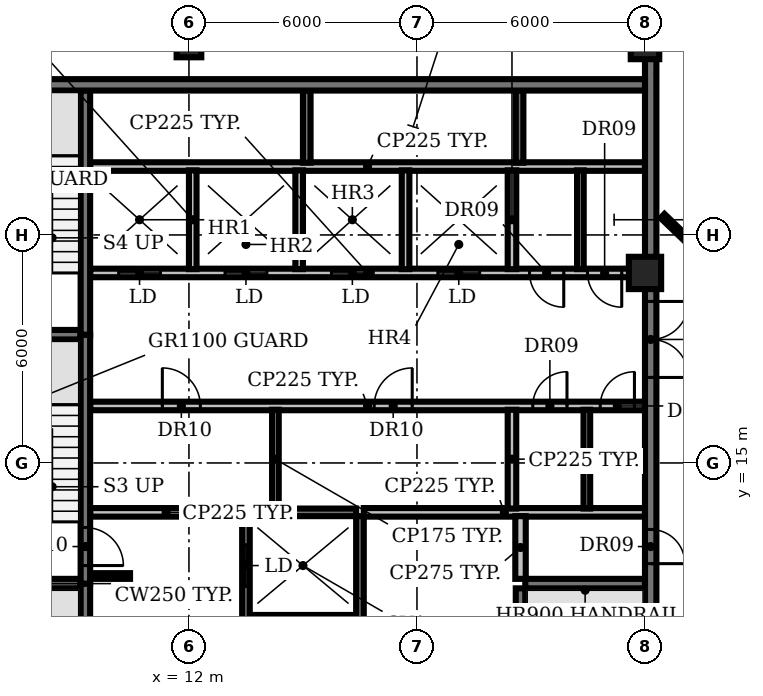
"""IFC4 building model, lengths in metres.
Left out: names, types, materials, properties, quantities, classifications, styles, units other than length and angle.
Written with IfcOpenShell. Run it as: python <this file> out.ifc"""

import sys

from ifc_helpers import new_model, si_unit, direction, frame, frame_2d, origin, origin_2d, place, context, subcontext, project, spatial, rectangle, circle, extrude, element, fill, save


model = new_model("IFC4")
c1 = context("Model", 3, precision=1e-05, world=origin(), true_north=direction((0.0, 1.0)))
c2 = subcontext(c1, "Body", "Model", "MODEL_VIEW")
j1 = project(units=[si_unit("LENGTHUNIT", "METRE"), si_unit("PLANEANGLEUNIT", "RADIAN")], contexts=[c1])
p1 = place(None, origin())
s1 = spatial("IfcSite", under=j1, at=p1, CompositionType="ELEMENT")
p2 = place(p1, origin())
s2 = spatial("IfcBuilding", under=s1, at=p2, CompositionType="ELEMENT")
p3 = place(p2, frame((0.0, 0.0, 293.6)))
s3 = spatial("IfcBuildingStorey", under=s2, at=p3, CompositionType="ELEMENT", Elevation=293.6)
p4 = place(p3, frame((12.0, 26.0, 0.0), z_axis=(0.0, 0.0, 1.0), x_axis=(1.0, 0.0, 0.0)))
e1 = element("IfcColumn", 1, at=p4, inside=s3, PredefinedType="COLUMN", context=c2, shape_type="SweptSolid", body=[
    extrude(rectangle(XDim=0.65, YDim=0.65, at=origin_2d()), origin(), (0.0, 0.0, 1.0), 3.85),
])
p5 = place(p3, frame((24.0, 20.0, 0.0), z_axis=(0.0, 0.0, 1.0), x_axis=(1.0, 0.0, 0.0)))
e2 = element("IfcColumn", 2, at=p5, inside=s3, PredefinedType="COLUMN", context=c2, shape_type="SweptSolid", body=[
    extrude(circle(Radius=0.425, at=origin_2d()), origin(), (0.0, 0.0, 1.0), 3.85),
])
p6 = place(p3, frame((24.0, 26.0, 0.0), z_axis=(0.0, 0.0, 1.0), x_axis=(1.0, 0.0, 0.0)))
e3 = element("IfcColumn", 3, at=p6, inside=s3, PredefinedType="COLUMN", context=c2, shape_type="SweptSolid", body=[
    extrude(rectangle(XDim=0.75, YDim=0.75, at=origin_2d()), origin(), (0.0, 0.0, 1.0), 3.85),
])
p7 = place(p3, frame((13.6, 10.9, 0.0), z_axis=(0.0, 0.0, 1.0), x_axis=(1.0, 0.0, 0.0)))
e4 = element("IfcWall", 4, at=p7, inside=s3, PredefinedType="SHEAR", context=c2, shape_type="SweptSolid", body=[
    extrude(rectangle(XDim=2.8, YDim=0.2, at=frame_2d((1.4, 0.0))), origin(), (0.0, 0.0, 1.0), 3.85),
])
for number, where, z_axis, x_axis in (
    (5, (6.0, 11.825, 0.0), (0.0, 0.0, 1.0), (1.0, 0.0, 0.0)),
    (6, (20.85, 11.825, 0.0), (0.0, 0.0, 1.0), (1.0, 0.0, 0.0)),
):
    element("IfcWall", number, at=place(p3, frame(where, z_axis=z_axis, x_axis=x_axis)), inside=s3, PredefinedType="SHEAR", context=c2, shape_type="SweptSolid", body=[
        extrude(rectangle(XDim=3.15, YDim=0.25, at=frame_2d((1.575, 0.0))), origin(), (0.0, 0.0, 1.0), 3.85),
    ])
p8 = place(p3, frame((9.4, 12.025, 0.0), z_axis=(0.0, 0.0, 1.0), x_axis=(1.0, 0.0, 0.0)))
e7 = element("IfcWall", 7, at=p8, inside=s3, PredefinedType="SHEAR", context=c2, shape_type="SweptSolid", body=[
    extrude(rectangle(XDim=1.05, YDim=0.15, at=frame_2d((0.525, 0.0))), origin(), (0.0, 0.0, 1.0), 3.85),
])
p9 = place(p3, frame((9.4, 13.7, 0.0), z_axis=(0.0, 0.0, 1.0), x_axis=(1.0, 0.0, 0.0)))
e8 = element("IfcWall", 8, at=p9, inside=s3, PredefinedType="PARTITIONING", context=c2, shape_type="SweptSolid", body=[
    extrude(rectangle(XDim=4.0, YDim=0.225, at=frame_2d((2.0, 0.0))), origin(), (0.0, 0.0, 1.0), 3.85),
])
p10 = place(p3, frame((13.6, 13.7, 0.0), z_axis=(0.0, 0.0, 1.0), x_axis=(1.0, 0.0, 0.0)))
e9 = element("IfcWall", 9, at=p10, inside=s3, PredefinedType="SHEAR", context=c2, shape_type="SweptSolid", body=[
    extrude(rectangle(XDim=2.8, YDim=0.2, at=frame_2d((1.4, 0.0))), origin(), (0.0, 0.0, 1.0), 3.85),
])
p11 = place(p3, frame((16.6, 13.7, 0.0), z_axis=(0.0, 0.0, 1.0), x_axis=(1.0, 0.0, 0.0)))
e10 = element("IfcWall", 10, at=p11, inside=s3, PredefinedType="PARTITIONING", context=c2, shape_type="SweptSolid", body=[
    extrude(rectangle(XDim=7.4, YDim=0.225, at=frame_2d((3.7, 0.0))), origin(), (0.0, 0.0, 1.0), 3.85),
])
p12 = place(p3, frame((9.4, 16.5, 0.0), z_axis=(0.0, 0.0, 1.0), x_axis=(1.0, 0.0, 0.0)))
e11 = element("IfcWall", 11, at=p12, inside=s3, PredefinedType="PARTITIONING", context=c2, shape_type="SweptSolid", body=[
    extrude(rectangle(XDim=14.6, YDim=0.225, at=frame_2d((7.3, 0.0))), origin(), (0.0, 0.0, 1.0), 3.85),
])
p13 = place(p12, frame((1.9, 0.0, 0.0)))
e12 = element("IfcOpeningElement", 12, at=p13, cuts=e11, PredefinedType="OPENING", context=c2, shape_type="SweptSolid", body=[
    extrude(rectangle(XDim=1.0, YDim=2.1, at=frame_2d((0.5, 1.05))), frame((0.0, 0.123, 0.0), z_axis=(0.0, -1.0, 0.0), x_axis=(1.0, 0.0, 0.0)), (0.0, 0.0, 1.0), 0.245),
])
p14 = place(p12, frame((7.475, 0.0, 0.0)))
e13 = element("IfcOpeningElement", 13, at=p14, cuts=e11, PredefinedType="OPENING", context=c2, shape_type="SweptSolid", body=[
    extrude(rectangle(XDim=1.0, YDim=2.1, at=frame_2d((0.5, 1.05))), frame((0.0, 0.123, 0.0), z_axis=(0.0, -1.0, 0.0), x_axis=(1.0, 0.0, 0.0)), (0.0, 0.0, 1.0), 0.245),
])
p15 = place(p12, frame((11.647, 0.0, 0.0)))
e14 = element("IfcOpeningElement", 14, at=p15, cuts=e11, PredefinedType="OPENING", context=c2, shape_type="SweptSolid", body=[
    extrude(rectangle(XDim=0.9, YDim=2.1, at=frame_2d((0.45, 1.05))), frame((0.0, 0.123, 0.0), z_axis=(0.0, -1.0, 0.0), x_axis=(1.0, 0.0, 0.0)), (0.0, 0.0, 1.0), 0.245),
])
p16 = place(p12, frame((13.423, 0.0, 0.0)))
e15 = element("IfcOpeningElement", 15, at=p16, cuts=e11, PredefinedType="OPENING", context=c2, shape_type="SweptSolid", body=[
    extrude(rectangle(XDim=0.9, YDim=2.1, at=frame_2d((0.45, 1.05))), frame((0.0, 0.123, 0.0), z_axis=(0.0, -1.0, 0.0), x_axis=(1.0, 0.0, 0.0)), (0.0, 0.0, 1.0), 0.245),
])
p17 = place(p3, frame((6.0, 18.375, 0.0), z_axis=(0.0, 0.0, 1.0), x_axis=(1.0, 0.0, 0.0)))
e16 = element("IfcWall", 16, at=p17, inside=s3, PredefinedType="SHEAR", context=c2, shape_type="SweptSolid", body=[
    extrude(rectangle(XDim=3.15, YDim=0.25, at=frame_2d((1.575, 0.0))), origin(), (0.0, 0.0, 1.0), 3.85),
])
p18 = place(p3, frame((24.0, 20.0, 0.0), z_axis=(0.0, 0.0, 1.0), x_axis=(-1.0, 0.0, 0.0)))
e17 = element("IfcWall", 17, at=p18, inside=s3, PredefinedType="PARTITIONING", context=c2, shape_type="SweptSolid", body=[
    extrude(rectangle(XDim=14.6, YDim=0.225, at=frame_2d((7.3, 0.0))), origin(), (0.0, 0.0, 1.0), 3.85),
])
p19 = place(p18, frame((12.75, 0.0, 0.0)))
e18 = element("IfcOpeningElement", 18, at=p19, cuts=e17, PredefinedType="OPENING", context=c2, shape_type="SweptSolid", body=[
    extrude(rectangle(XDim=1.1, YDim=2.1, at=frame_2d((0.55, 1.05))), frame((0.0, 0.123, 0.0), z_axis=(0.0, -1.0, 0.0), x_axis=(1.0, 0.0, 0.0)), (0.0, 0.0, 1.0), 0.245),
])
p20 = place(p18, frame((9.95, 0.0, 0.0)))
e19 = element("IfcOpeningElement", 19, at=p20, cuts=e17, PredefinedType="OPENING", context=c2, shape_type="SweptSolid", body=[
    extrude(rectangle(XDim=1.1, YDim=2.1, at=frame_2d((0.55, 1.05))), frame((0.0, 0.123, 0.0), z_axis=(0.0, -1.0, 0.0), x_axis=(1.0, 0.0, 0.0)), (0.0, 0.0, 1.0), 0.245),
])
p21 = place(p18, frame((7.15, 0.0, 0.0)))
e20 = element("IfcOpeningElement", 20, at=p21, cuts=e17, PredefinedType="OPENING", context=c2, shape_type="SweptSolid", body=[
    extrude(rectangle(XDim=1.1, YDim=2.1, at=frame_2d((0.55, 1.05))), frame((0.0, 0.123, 0.0), z_axis=(0.0, -1.0, 0.0), x_axis=(1.0, 0.0, 0.0)), (0.0, 0.0, 1.0), 0.245),
])
p22 = place(p18, frame((4.35, 0.0, 0.0)))
e21 = element("IfcOpeningElement", 21, at=p22, cuts=e17, PredefinedType="OPENING", context=c2, shape_type="SweptSolid", body=[
    extrude(rectangle(XDim=1.1, YDim=2.1, at=frame_2d((0.55, 1.05))), frame((0.0, 0.123, 0.0), z_axis=(0.0, -1.0, 0.0), x_axis=(1.0, 0.0, 0.0)), (0.0, 0.0, 1.0), 0.245),
])
p23 = place(p18, frame((2.137, 0.0, 0.0)))
e22 = element("IfcOpeningElement", 22, at=p23, cuts=e17, PredefinedType="OPENING", context=c2, shape_type="SweptSolid", body=[
    extrude(rectangle(XDim=0.9, YDim=2.1, at=frame_2d((0.45, 1.05))), frame((0.0, 0.123, 0.0), z_axis=(0.0, -1.0, 0.0), x_axis=(1.0, 0.0, 0.0)), (0.0, 0.0, 1.0), 0.245),
])
p24 = place(p18, frame((0.612, 0.0, 0.0)))
e23 = element("IfcOpeningElement", 23, at=p24, cuts=e17, PredefinedType="OPENING", context=c2, shape_type="SweptSolid", body=[
    extrude(rectangle(XDim=0.9, YDim=2.1, at=frame_2d((0.45, 1.05))), frame((0.0, 0.123, 0.0), z_axis=(0.0, -1.0, 0.0), x_axis=(1.0, 0.0, 0.0)), (0.0, 0.0, 1.0), 0.245),
])
p25 = place(p3, frame((9.4, 22.8, 0.0), z_axis=(0.0, 0.0, 1.0), x_axis=(1.0, 0.0, 0.0)))
e24 = element("IfcWall", 24, at=p25, inside=s3, PredefinedType="PARTITIONING", context=c2, shape_type="SweptSolid", body=[
    extrude(rectangle(XDim=14.6, YDim=0.225, at=frame_2d((7.3, 0.0))), origin(), (0.0, 0.0, 1.0), 3.85),
])
p26 = place(p3, frame((9.275, 11.825, 0.0), z_axis=(0.0, 0.0, 1.0), x_axis=(0.0, -1.0, 0.0)))
e25 = element("IfcWall", 25, at=p26, inside=s3, PredefinedType="SHEAR", context=c2, shape_type="SweptSolid", body=[
    extrude(rectangle(XDim=6.425, YDim=0.25, at=frame_2d((3.212, 0.0))), origin(), (0.0, 0.0, 1.0), 3.85),
])
p27 = place(p26, frame((5.075, 0.0, 0.0)))
e26 = element("IfcOpeningElement", 26, at=p27, cuts=e25, PredefinedType="OPENING", context=c2, shape_type="SweptSolid", body=[
    extrude(rectangle(XDim=1.0, YDim=2.1, at=frame_2d((0.5, 1.05))), frame((0.0, 0.135, 0.0), z_axis=(0.0, -1.0, 0.0), x_axis=(1.0, 0.0, 0.0)), (0.0, 0.0, 1.0), 0.27),
])
p28 = place(p3, frame((9.275, 18.375, 0.0), z_axis=(0.0, 0.0, 1.0), x_axis=(0.0, -1.0, 0.0)))
e27 = element("IfcWall", 27, at=p28, inside=s3, PredefinedType="SHEAR", context=c2, shape_type="SweptSolid", body=[
    extrude(rectangle(XDim=6.55, YDim=0.25, at=frame_2d((3.275, 0.0))), origin(), (0.0, 0.0, 1.0), 3.85),
])
p29 = place(p28, frame((5.075, 0.0, 0.0)))
e28 = element("IfcOpeningElement", 28, at=p29, cuts=e27, PredefinedType="OPENING", context=c2, shape_type="SweptSolid", body=[
    extrude(rectangle(XDim=1.0, YDim=2.1, at=frame_2d((0.5, 1.05))), frame((0.0, 0.135, 0.0), z_axis=(0.0, -1.0, 0.0), x_axis=(1.0, 0.0, 0.0)), (0.0, 0.0, 1.0), 0.27),
])
p30 = place(p3, frame((9.275, 18.375, 0.0), z_axis=(0.0, 0.0, 1.0), x_axis=(0.0, 1.0, 0.0)))
e29 = element("IfcWall", 29, at=p30, inside=s3, PredefinedType="SHEAR", context=c2, shape_type="SweptSolid", body=[
    extrude(rectangle(XDim=6.425, YDim=0.25, at=frame_2d((3.212, 0.0))), origin(), (0.0, 0.0, 1.0), 3.85),
])
p31 = place(p3, frame((12.1, 20.1, 0.0), z_axis=(0.0, 0.0, 1.0), x_axis=(0.0, 1.0, 0.0)))
e30 = element("IfcWall", 30, at=p31, inside=s3, PredefinedType="SOLIDWALL", context=c2, shape_type="SweptSolid", body=[
    extrude(rectangle(XDim=2.6, YDim=0.2, at=frame_2d((1.3, 0.0))), origin(), (0.0, 0.0, 1.0), 3.85),
])
p32 = place(p3, frame((13.5, 5.4, 0.0), z_axis=(0.0, 0.0, 1.0), x_axis=(0.0, 1.0, 0.0)))
e31 = element("IfcWall", 31, at=p32, inside=s3, PredefinedType="SHEAR", context=c2, shape_type="SweptSolid", body=[
    extrude(rectangle(XDim=8.2, YDim=0.2, at=frame_2d((4.1, 0.0))), origin(), (0.0, 0.0, 1.0), 3.85),
])
p33 = place(p32, frame((0.75, 0.0, 0.0)))
e32 = element("IfcOpeningElement", 32, at=p33, cuts=e31, PredefinedType="OPENING", context=c2, shape_type="SweptSolid", body=[
    extrude(rectangle(XDim=1.1, YDim=2.1, at=frame_2d((0.55, 1.05))), frame((0.0, 0.11, 0.0), z_axis=(0.0, -1.0, 0.0), x_axis=(1.0, 0.0, 0.0)), (0.0, 0.0, 1.0), 0.22),
])
p34 = place(p32, frame((3.55, 0.0, 0.0)))
e33 = element("IfcOpeningElement", 33, at=p34, cuts=e31, PredefinedType="OPENING", context=c2, shape_type="SweptSolid", body=[
    extrude(rectangle(XDim=1.1, YDim=2.1, at=frame_2d((0.55, 1.05))), frame((0.0, 0.11, 0.0), z_axis=(0.0, -1.0, 0.0), x_axis=(1.0, 0.0, 0.0)), (0.0, 0.0, 1.0), 0.22),
])
p35 = place(p32, frame((6.35, 0.0, 0.0)))
e34 = element("IfcOpeningElement", 34, at=p35, cuts=e31, PredefinedType="OPENING", context=c2, shape_type="SweptSolid", body=[
    extrude(rectangle(XDim=1.1, YDim=2.1, at=frame_2d((0.55, 1.05))), frame((0.0, 0.11, 0.0), z_axis=(0.0, -1.0, 0.0), x_axis=(1.0, 0.0, 0.0)), (0.0, 0.0, 1.0), 0.22),
])
p36 = place(p3, frame((14.275, 13.8, 0.0), z_axis=(0.0, 0.0, 1.0), x_axis=(0.0, 1.0, 0.0)))
e35 = element("IfcWall", 35, at=p36, inside=s3, PredefinedType="PARTITIONING", context=c2, shape_type="SweptSolid", body=[
    extrude(rectangle(XDim=2.6, YDim=0.175, at=frame_2d((1.3, 0.0))), origin(), (0.0, 0.0, 1.0), 3.85),
])
p37 = place(p3, frame((14.9, 20.1, 0.0), z_axis=(0.0, 0.0, 1.0), x_axis=(0.0, 1.0, 0.0)))
e36 = element("IfcWall", 36, at=p37, inside=s3, PredefinedType="SOLIDWALL", context=c2, shape_type="SweptSolid", body=[
    extrude(rectangle(XDim=2.6, YDim=0.2, at=frame_2d((1.3, 0.0))), origin(), (0.0, 0.0, 1.0), 3.85),
])
p38 = place(p3, frame((15.1, 22.9, 0.0), z_axis=(0.0, 0.0, 1.0), x_axis=(0.0, 1.0, 0.0)))
e37 = element("IfcWall", 37, at=p38, inside=s3, PredefinedType="SHEAR", context=c2, shape_type="SweptSolid", body=[
    extrude(rectangle(XDim=1.9, YDim=0.2, at=frame_2d((0.95, 0.0))), origin(), (0.0, 0.0, 1.0), 3.85),
])
p39 = place(p3, frame((16.5, 5.4, 0.0), z_axis=(0.0, 0.0, 1.0), x_axis=(0.0, 1.0, 0.0)))
e38 = element("IfcWall", 38, at=p39, inside=s3, PredefinedType="SHEAR", context=c2, shape_type="SweptSolid", body=[
    extrude(rectangle(XDim=8.2, YDim=0.2, at=frame_2d((4.1, 0.0))), origin(), (0.0, 0.0, 1.0), 3.85),
])
p40 = place(p3, frame((17.7, 20.1, 0.0), z_axis=(0.0, 0.0, 1.0), x_axis=(0.0, 1.0, 0.0)))
e39 = element("IfcWall", 39, at=p40, inside=s3, PredefinedType="SOLIDWALL", context=c2, shape_type="SweptSolid", body=[
    extrude(rectangle(XDim=2.6, YDim=0.2, at=frame_2d((1.3, 0.0))), origin(), (0.0, 0.0, 1.0), 3.85),
])
for number, where, z_axis, x_axis in (
    (40, (20.5, 13.8, 0.0), (0.0, 0.0, 1.0), (0.0, 1.0, 0.0)),
    (41, (20.5, 20.1, 0.0), (0.0, 0.0, 1.0), (0.0, 1.0, 0.0)),
):
    element("IfcWall", number, at=place(p3, frame(where, z_axis=z_axis, x_axis=x_axis)), inside=s3, PredefinedType="PARTITIONING", context=c2, shape_type="SweptSolid", body=[
        extrude(rectangle(XDim=2.6, YDim=0.225, at=frame_2d((1.3, 0.0))), origin(), (0.0, 0.0, 1.0), 3.85),
    ])
p41 = place(p3, frame((20.7, 22.9, 0.0), z_axis=(0.0, 0.0, 1.0), x_axis=(0.0, 1.0, 0.0)))
e42 = element("IfcWall", 42, at=p41, inside=s3, PredefinedType="SHEAR", context=c2, shape_type="SweptSolid", body=[
    extrude(rectangle(XDim=1.9, YDim=0.2, at=frame_2d((0.95, 0.0))), origin(), (0.0, 0.0, 1.0), 3.85),
])
p42 = place(p3, frame((20.725, 5.4, 0.0), z_axis=(0.0, 0.0, 1.0), x_axis=(0.0, 1.0, 0.0)))
e43 = element("IfcWall", 43, at=p42, inside=s3, PredefinedType="SHEAR", context=c2, shape_type="SweptSolid", body=[
    extrude(rectangle(XDim=6.3, YDim=0.25, at=frame_2d((3.15, 0.0))), origin(), (0.0, 0.0, 1.0), 3.85),
])
p43 = place(p3, frame((20.725, 11.95, 0.0), z_axis=(0.0, 0.0, 1.0), x_axis=(0.0, 1.0, 0.0)))
e44 = element("IfcWall", 44, at=p43, inside=s3, PredefinedType="PARTITIONING", context=c2, shape_type="SweptSolid", body=[
    extrude(rectangle(XDim=1.65, YDim=0.275, at=frame_2d((0.825, 0.0))), origin(), (0.0, 0.0, 1.0), 3.85),
])
for number, where, z_axis, x_axis in (
    (45, (22.3, 20.1, 0.0), (0.0, 0.0, 1.0), (0.0, 1.0, 0.0)),
    (46, (22.47, 13.8, 0.0), (0.0, 0.0, 1.0), (0.0, 1.0, 0.0)),
):
    element("IfcWall", number, at=place(p3, frame(where, z_axis=z_axis, x_axis=x_axis)), inside=s3, PredefinedType="PARTITIONING", context=c2, shape_type="SweptSolid", body=[
        extrude(rectangle(XDim=2.6, YDim=0.175, at=frame_2d((1.3, 0.0))), origin(), (0.0, 0.0, 1.0), 3.85),
    ])
p44 = place(p3, frame((24.15, 25.655, 0.0), z_axis=(0.0, 0.0, 1.0), x_axis=(0.0, -1.0, 0.0)))
e47 = element("IfcWall", 47, at=p44, inside=s3, PredefinedType="SHEAR", context=c2, shape_type="SweptSolid", body=[
    extrude(rectangle(XDim=20.555, YDim=0.3, at=frame_2d((10.277, 0.0))), origin(), (0.0, 0.0, 1.0), 3.85),
])
p45 = place(p44, frame((18.505, 0.0, 0.0)))
e48 = element("IfcOpeningElement", 48, at=p45, cuts=e47, PredefinedType="OPENING", context=c2, shape_type="SweptSolid", body=[
    extrude(rectangle(XDim=1.5, YDim=2.1, at=frame_2d((0.75, 1.05))), frame((0.0, 0.16, 0.0), z_axis=(0.0, -1.0, 0.0), x_axis=(1.0, 0.0, 0.0)), (0.0, 0.0, 1.0), 0.32),
])
p46 = place(p44, frame((12.405, 0.0, 0.0)))
e49 = element("IfcOpeningElement", 49, at=p46, cuts=e47, PredefinedType="OPENING", context=c2, shape_type="SweptSolid", body=[
    extrude(rectangle(XDim=0.9, YDim=2.1, at=frame_2d((0.45, 1.05))), frame((0.0, 0.16, 0.0), z_axis=(0.0, -1.0, 0.0), x_axis=(1.0, 0.0, 0.0)), (0.0, 0.0, 1.0), 0.32),
])
p47 = place(p44, frame((6.405, 0.0, 0.0)))
e50 = element("IfcOpeningElement", 50, at=p47, cuts=e47, PredefinedType="OPENING", context=c2, shape_type="SweptSolid", body=[
    extrude(rectangle(XDim=2.0, YDim=2.1, at=frame_2d((1.0, 1.05))), frame((0.0, 0.16, 0.0), z_axis=(0.0, -1.0, 0.0), x_axis=(1.0, 0.0, 0.0)), (0.0, 0.0, 1.0), 0.32),
])
p48 = place(p3, frame((6.0, 24.95, 0.0), z_axis=(0.0, 0.0, 1.0), x_axis=(1.0, 0.0, 0.0)))
e51 = element("IfcWall", 51, at=p48, inside=s3, PredefinedType="SHEAR", context=c2, shape_type="SweptSolid", body=[
    extrude(rectangle(XDim=18.0, YDim=0.3, at=frame_2d((9.0, 0.0))), origin(), (0.0, 0.0, 1.0), 3.85),
])
p49 = place(p3, frame((24.46, 21.5, 0.0), z_axis=(0.0, 0.0, 1.0), x_axis=(0.720809322513, -0.69313340749, 0.0)))
e52 = element("IfcWall", 52, at=p49, inside=s3, PredefinedType="PARTITIONING", context=c2, shape_type="SweptSolid", body=[
    extrude(rectangle(XDim=0.988, YDim=0.15, at=frame_2d((0.494, 0.0))), origin(), (0.0, 0.0, 1.0), 2.9),
])
p50 = place(p13, origin())
e53 = element("IfcDoor", 53, at=p50, inside=s3, OperationType="SINGLE_SWING_LEFT", PredefinedType="DOOR", context=c2, shape_type="SweptSolid", body=[
    extrude(rectangle(XDim=1.0, YDim=2.1, at=frame_2d((0.5, 1.05))), frame((0.0, 0.025, 0.0), z_axis=(0.0, -1.0, 0.0), x_axis=(1.0, 0.0, 0.0)), (0.0, 0.0, 1.0), 0.05),
])
fill(e12, e53)
p51 = place(p14, origin())
e54 = element("IfcDoor", 54, at=p51, inside=s3, OperationType="SINGLE_SWING_RIGHT", PredefinedType="DOOR", context=c2, shape_type="SweptSolid", body=[
    extrude(rectangle(XDim=1.0, YDim=2.1, at=frame_2d((0.5, 1.05))), frame((0.0, 0.025, 0.0), z_axis=(0.0, -1.0, 0.0), x_axis=(1.0, 0.0, 0.0)), (0.0, 0.0, 1.0), 0.05),
])
fill(e13, e54)
p52 = place(p15, origin())
e55 = element("IfcDoor", 55, at=p52, inside=s3, OperationType="SINGLE_SWING_RIGHT", PredefinedType="DOOR", context=c2, shape_type="SweptSolid", body=[
    extrude(rectangle(XDim=0.9, YDim=2.1, at=frame_2d((0.45, 1.05))), frame((0.0, 0.025, 0.0), z_axis=(0.0, -1.0, 0.0), x_axis=(1.0, 0.0, 0.0)), (0.0, 0.0, 1.0), 0.05),
])
fill(e14, e55)
p53 = place(p16, origin())
e56 = element("IfcDoor", 56, at=p53, inside=s3, OperationType="SINGLE_SWING_RIGHT", PredefinedType="DOOR", context=c2, shape_type="SweptSolid", body=[
    extrude(rectangle(XDim=0.9, YDim=2.1, at=frame_2d((0.45, 1.05))), frame((0.0, 0.025, 0.0), z_axis=(0.0, -1.0, 0.0), x_axis=(1.0, 0.0, 0.0)), (0.0, 0.0, 1.0), 0.05),
])
fill(e15, e56)
p54 = place(p19, origin())
e57 = element("IfcDoor", 57, at=p54, inside=s3, OperationType="DOUBLE_DOOR_SLIDING", PredefinedType="DOOR", context=c2, shape_type="SweptSolid", body=[
    extrude(rectangle(XDim=1.1, YDim=2.1, at=frame_2d((0.55, 1.05))), frame((0.0, 0.025, 0.0), z_axis=(0.0, -1.0, 0.0), x_axis=(1.0, 0.0, 0.0)), (0.0, 0.0, 1.0), 0.05),
])
fill(e18, e57)
p55 = place(p20, origin())
e58 = element("IfcDoor", 58, at=p55, inside=s3, OperationType="DOUBLE_DOOR_SLIDING", PredefinedType="DOOR", context=c2, shape_type="SweptSolid", body=[
    extrude(rectangle(XDim=1.1, YDim=2.1, at=frame_2d((0.55, 1.05))), frame((0.0, 0.025, 0.0), z_axis=(0.0, -1.0, 0.0), x_axis=(1.0, 0.0, 0.0)), (0.0, 0.0, 1.0), 0.05),
])
fill(e19, e58)
p56 = place(p21, origin())
e59 = element("IfcDoor", 59, at=p56, inside=s3, OperationType="DOUBLE_DOOR_SLIDING", PredefinedType="DOOR", context=c2, shape_type="SweptSolid", body=[
    extrude(rectangle(XDim=1.1, YDim=2.1, at=frame_2d((0.55, 1.05))), frame((0.0, 0.025, 0.0), z_axis=(0.0, -1.0, 0.0), x_axis=(1.0, 0.0, 0.0)), (0.0, 0.0, 1.0), 0.05),
])
fill(e20, e59)
p57 = place(p22, origin())
e60 = element("IfcDoor", 60, at=p57, inside=s3, OperationType="DOUBLE_DOOR_SLIDING", PredefinedType="DOOR", context=c2, shape_type="SweptSolid", body=[
    extrude(rectangle(XDim=1.1, YDim=2.1, at=frame_2d((0.55, 1.05))), frame((0.0, 0.025, 0.0), z_axis=(0.0, -1.0, 0.0), x_axis=(1.0, 0.0, 0.0)), (0.0, 0.0, 1.0), 0.05),
])
fill(e21, e60)
p58 = place(p23, origin())
e61 = element("IfcDoor", 61, at=p58, inside=s3, OperationType="SINGLE_SWING_LEFT", PredefinedType="DOOR", context=c2, shape_type="SweptSolid", body=[
    extrude(rectangle(XDim=0.9, YDim=2.1, at=frame_2d((0.45, 1.05))), frame((0.0, 0.025, 0.0), z_axis=(0.0, -1.0, 0.0), x_axis=(1.0, 0.0, 0.0)), (0.0, 0.0, 1.0), 0.05),
])
fill(e22, e61)
p59 = place(p24, origin())
e62 = element("IfcDoor", 62, at=p59, inside=s3, OperationType="SINGLE_SWING_LEFT", PredefinedType="DOOR", context=c2, shape_type="SweptSolid", body=[
    extrude(rectangle(XDim=0.9, YDim=2.1, at=frame_2d((0.45, 1.05))), frame((0.0, 0.025, 0.0), z_axis=(0.0, -1.0, 0.0), x_axis=(1.0, 0.0, 0.0)), (0.0, 0.0, 1.0), 0.05),
])
fill(e23, e62)
p60 = place(p29, origin())
e63 = element("IfcDoor", 63, at=p60, inside=s3, OperationType="SINGLE_SWING_RIGHT", PredefinedType="DOOR", context=c2, shape_type="SweptSolid", body=[
    extrude(rectangle(XDim=1.0, YDim=2.1, at=frame_2d((0.5, 1.05))), frame((0.0, 0.025, 0.0), z_axis=(0.0, -1.0, 0.0), x_axis=(1.0, 0.0, 0.0)), (0.0, 0.0, 1.0), 0.05),
])
fill(e28, e63)
p61 = place(p35, origin())
e64 = element("IfcDoor", 64, at=p61, inside=s3, OperationType="DOUBLE_DOOR_SLIDING", PredefinedType="DOOR", context=c2, shape_type="SweptSolid", body=[
    extrude(rectangle(XDim=1.1, YDim=2.1, at=frame_2d((0.55, 1.05))), frame((0.0, 0.025, 0.0), z_axis=(0.0, -1.0, 0.0), x_axis=(1.0, 0.0, 0.0)), (0.0, 0.0, 1.0), 0.05),
])
fill(e34, e64)
p62 = place(p46, origin())
e65 = element("IfcDoor", 65, at=p62, inside=s3, OperationType="SINGLE_SWING_RIGHT", PredefinedType="DOOR", context=c2, shape_type="SweptSolid", body=[
    extrude(rectangle(XDim=0.9, YDim=2.1, at=frame_2d((0.45, 1.05))), frame((0.0, 0.025, 0.0), z_axis=(0.0, -1.0, 0.0), x_axis=(1.0, 0.0, 0.0)), (0.0, 0.0, 1.0), 0.05),
])
fill(e49, e65)
p63 = place(p47, origin())
e66 = element("IfcDoor", 66, at=p63, inside=s3, OperationType="DOUBLE_DOOR_SINGLE_SWING", PredefinedType="DOOR", context=c2, shape_type="SweptSolid", body=[
    extrude(rectangle(XDim=2.0, YDim=2.1, at=frame_2d((1.0, 1.05))), frame((0.0, 0.025, 0.0), z_axis=(0.0, -1.0, 0.0), x_axis=(1.0, 0.0, 0.0)), (0.0, 0.0, 1.0), 0.05),
])
fill(e50, e66)
save(model, sys.argv[1])
